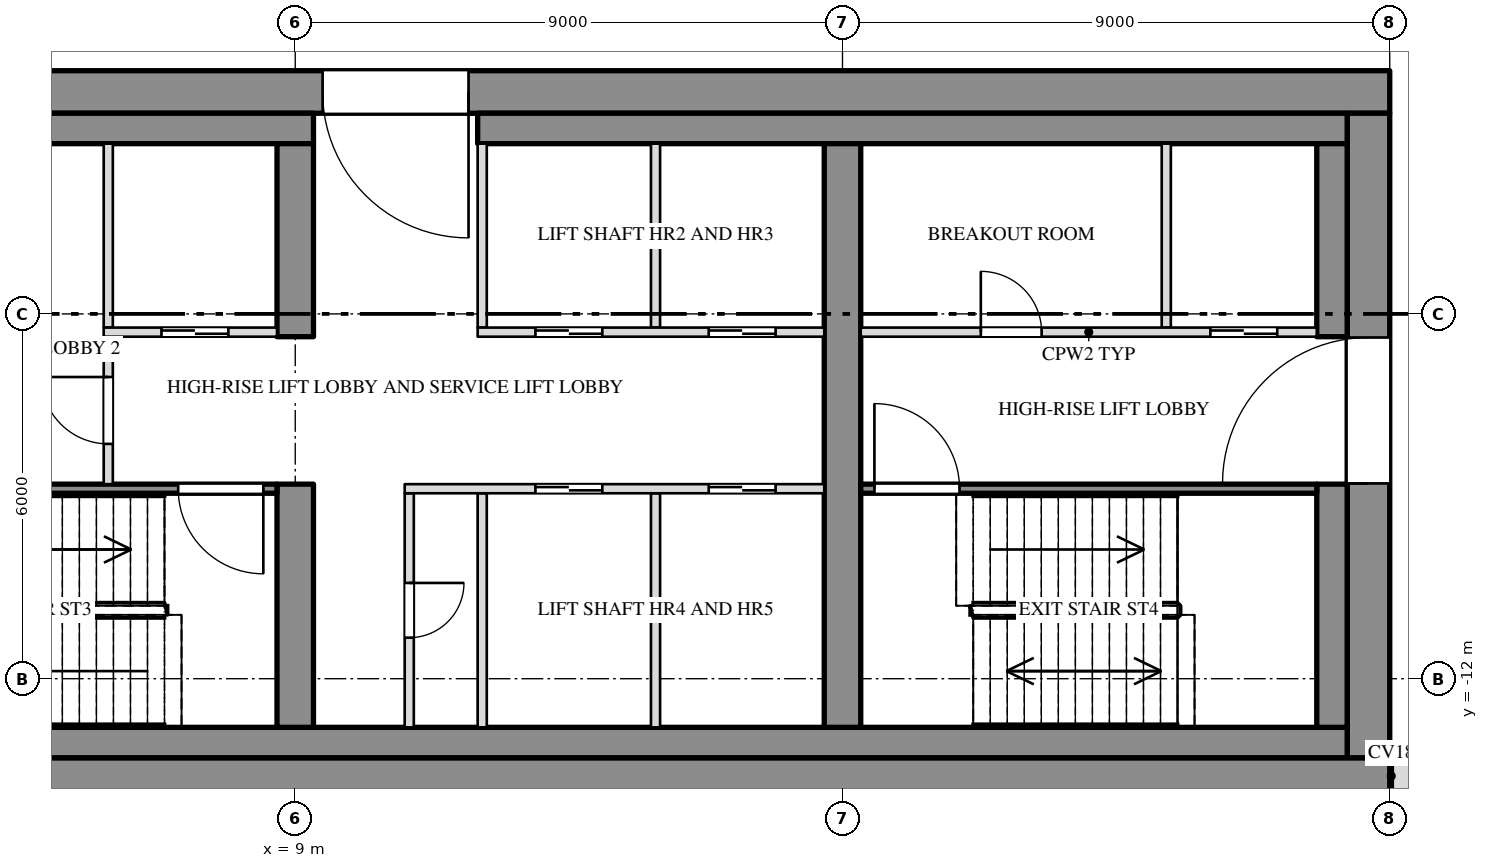
"""IFC4 building model, lengths in metres.
Left out: names, types, materials, properties, quantities, classifications, styles, units other than length and angle.
Written with IfcOpenShell. Run it as: python <this file> out.ifc"""

import sys

from ifc_helpers import new_model, si_unit, direction, frame, frame_2d, origin, place, context, subcontext, project, spatial, rectangle, extrude, element, fill, save


model = new_model("IFC4")
c1 = context("Model", 3, precision=1e-05, world=origin(), true_north=direction((0.0, 1.0)))
c2 = subcontext(c1, "Body", "Model", "MODEL_VIEW")
j1 = project(units=[si_unit("LENGTHUNIT", "METRE"), si_unit("PLANEANGLEUNIT", "RADIAN")], contexts=[c1])
p1 = place(None, origin())
s1 = spatial("IfcSite", under=j1, at=p1, CompositionType="ELEMENT")
p2 = place(p1, origin())
s2 = spatial("IfcBuilding", under=s1, at=p2, CompositionType="ELEMENT")
p3 = place(p2, frame((0.0, 0.0, 260.5)))
s3 = spatial("IfcBuildingStorey", under=s2, at=p3, CompositionType="ELEMENT", Elevation=260.5)
p4 = place(p3, frame((-27.0, -2.35, 0.0), z_axis=(0.0, 0.0, 1.0), x_axis=(1.0, 0.0, 0.0)))
e1 = element("IfcWall", 1, at=p4, inside=s3, PredefinedType="SHEAR", context=c2, shape_type="SweptSolid", body=[
    extrude(rectangle(XDim=54.0, YDim=0.7, at=frame_2d((27.0, 0.0))), origin(), (0.0, 0.0, 1.0), 3.7),
])
p5 = place(p4, frame((15.15, 0.0, 0.0)))
e2 = element("IfcOpeningElement", 2, at=p5, cuts=e1, PredefinedType="OPENING", context=c2, shape_type="SweptSolid", body=[
    extrude(rectangle(XDim=2.4, YDim=2.1, at=frame_2d((1.2, 1.05))), frame((0.0, 0.362, 0.0), z_axis=(0.0, -1.0, 0.0), x_axis=(1.0, 0.0, 0.0)), (0.0, 0.0, 1.0), 0.724),
])
p6 = place(p4, frame((36.45, 0.0, 0.0)))
e3 = element("IfcOpeningElement", 3, at=p6, cuts=e1, PredefinedType="OPENING", context=c2, shape_type="SweptSolid", body=[
    extrude(rectangle(XDim=2.4, YDim=2.1, at=frame_2d((1.2, 1.05))), frame((0.0, 0.362, 0.0), z_axis=(0.0, -1.0, 0.0), x_axis=(1.0, 0.0, 0.0)), (0.0, 0.0, 1.0), 0.724),
])
p7 = place(p3, frame((-27.0, -13.65, 0.0), z_axis=(0.0, 0.0, 1.0), x_axis=(1.0, 0.0, 0.0)))
e4 = element("IfcWall", 4, at=p7, inside=s3, PredefinedType="SHEAR", context=c2, shape_type="SweptSolid", body=[
    extrude(rectangle(XDim=54.0, YDim=0.7, at=frame_2d((27.0, 0.0))), origin(), (0.0, 0.0, 1.0), 3.7),
])
p8 = place(p3, frame((26.65, -13.3, 0.0), z_axis=(0.0, 0.0, 1.0), x_axis=(0.0, 1.0, 0.0)))
e5 = element("IfcWall", 5, at=p8, inside=s3, PredefinedType="SHEAR", context=c2, shape_type="SweptSolid", body=[
    extrude(rectangle(XDim=10.6, YDim=0.7, at=frame_2d((5.3, 0.0))), origin(), (0.0, 0.0, 1.0), 3.7),
])
p9 = place(p8, frame((4.512, 0.0, 0.0)))
e6 = element("IfcOpeningElement", 6, at=p9, cuts=e5, PredefinedType="OPENING", context=c2, shape_type="SweptSolid", body=[
    extrude(rectangle(XDim=2.4, YDim=2.1, at=frame_2d((1.2, 1.05))), frame((0.0, 0.362, 0.0), z_axis=(0.0, -1.0, 0.0), x_axis=(1.0, 0.0, 0.0)), (0.0, 0.0, 1.0), 0.724),
])
p10 = place(p3, frame((-9.3, -2.95, 0.0), z_axis=(0.0, 0.0, 1.0), x_axis=(1.0, 0.0, 0.0)))
e7 = element("IfcWall", 7, at=p10, inside=s3, PredefinedType="SHEAR", context=c2, shape_type="SweptSolid", body=[
    extrude(rectangle(XDim=18.6, YDim=0.5, at=frame_2d((9.3, 0.0))), origin(), (0.0, 0.0, 1.0), 3.7),
])
p11 = place(p3, frame((12.0, -2.95, 0.0), z_axis=(0.0, 0.0, 1.0), x_axis=(1.0, 0.0, 0.0)))
e8 = element("IfcWall", 8, at=p11, inside=s3, PredefinedType="SHEAR", context=c2, shape_type="SweptSolid", body=[
    extrude(rectangle(XDim=14.3, YDim=0.5, at=frame_2d((7.15, 0.0))), origin(), (0.0, 0.0, 1.0), 3.7),
])
p12 = place(p3, frame((-26.3, -13.05, 0.0), z_axis=(0.0, 0.0, 1.0), x_axis=(1.0, 0.0, 0.0)))
e9 = element("IfcWall", 9, at=p12, inside=s3, PredefinedType="SHEAR", context=c2, shape_type="SweptSolid", body=[
    extrude(rectangle(XDim=52.6, YDim=0.5, at=frame_2d((26.3, 0.0))), origin(), (0.0, 0.0, 1.0), 3.7),
])
p13 = place(p3, frame((26.05, -12.8, 0.0), z_axis=(0.0, 0.0, 1.0), x_axis=(0.0, 1.0, 0.0)))
e10 = element("IfcWall", 10, at=p13, inside=s3, PredefinedType="SHEAR", context=c2, shape_type="SweptSolid", body=[
    extrude(rectangle(XDim=4.0, YDim=0.5, at=frame_2d((2.0, 0.0))), origin(), (0.0, 0.0, 1.0), 3.7),
])
p14 = place(p3, frame((26.05, -6.375, 0.0), z_axis=(0.0, 0.0, 1.0), x_axis=(0.0, 1.0, 0.0)))
e11 = element("IfcWall", 11, at=p14, inside=s3, PredefinedType="SHEAR", context=c2, shape_type="SweptSolid", body=[
    extrude(rectangle(XDim=3.175, YDim=0.5, at=frame_2d((1.587, 0.0))), origin(), (0.0, 0.0, 1.0), 3.7),
])
p15 = place(p3, frame((9.0, -12.8, 0.0), z_axis=(0.0, 0.0, 1.0), x_axis=(0.0, 1.0, 0.0)))
e12 = element("IfcWall", 12, at=p15, inside=s3, PredefinedType="SHEAR", context=c2, shape_type="SweptSolid", body=[
    extrude(rectangle(XDim=4.0, YDim=0.6, at=frame_2d((2.0, 0.0))), origin(), (0.0, 0.0, 1.0), 3.7),
])
p16 = place(p3, frame((9.0, -6.375, 0.0), z_axis=(0.0, 0.0, 1.0), x_axis=(0.0, 1.0, 0.0)))
e13 = element("IfcWall", 13, at=p16, inside=s3, PredefinedType="SHEAR", context=c2, shape_type="SweptSolid", body=[
    extrude(rectangle(XDim=3.175, YDim=0.6, at=frame_2d((1.587, 0.0))), origin(), (0.0, 0.0, 1.0), 3.7),
])
p17 = place(p3, frame((18.0, -12.8, 0.0), z_axis=(0.0, 0.0, 1.0), x_axis=(0.0, 1.0, 0.0)))
e14 = element("IfcWall", 14, at=p17, inside=s3, PredefinedType="SHEAR", context=c2, shape_type="SweptSolid", body=[
    extrude(rectangle(XDim=9.6, YDim=0.6, at=frame_2d((4.8, 0.0))), origin(), (0.0, 0.0, 1.0), 3.7),
])
p18 = place(p3, frame((27.05, -13.6, 0.0), z_axis=(0.0, 0.0, 1.0), x_axis=(1.0, 0.0, 0.0)))
e15 = element("IfcWall", 15, at=p18, inside=s3, PredefinedType="SOLIDWALL", context=c2, shape_type="SweptSolid", body=[
    extrude(rectangle(XDim=2.897, YDim=0.8, at=frame_2d((1.449, 0.0))), origin(), (0.0, 0.0, 1.0), 3.7),
])
for number, where, z_axis, x_axis in (
    (16, (5.925, -6.225, 0.0), (0.0, 0.0, 1.0), (0.0, 1.0, 0.0)),
    (17, (12.075, -6.225, 0.0), (0.0, 0.0, 1.0), (0.0, 1.0, 0.0)),
    (18, (14.925, -6.225, 0.0), (0.0, 0.0, 1.0), (0.0, 1.0, 0.0)),
    (19, (23.325, -6.225, 0.0), (0.0, 0.0, 1.0), (0.0, 1.0, 0.0)),
):
    element("IfcWall", number, at=place(p3, frame(where, z_axis=z_axis, x_axis=x_axis)), inside=s3, PredefinedType="PARTITIONING", context=c2, shape_type="SweptSolid", body=[
        extrude(rectangle(XDim=3.025, YDim=0.15, at=frame_2d((1.513, 0.0))), origin(), (0.0, 0.0, 1.0), 3.7),
    ])
p19 = place(p3, frame((10.875, -12.8, 0.0), z_axis=(0.0, 0.0, 1.0), x_axis=(0.0, 1.0, 0.0)))
e20 = element("IfcWall", 20, at=p19, inside=s3, PredefinedType="PARTITIONING", context=c2, shape_type="SweptSolid", body=[
    extrude(rectangle(XDim=3.85, YDim=0.15, at=frame_2d((1.925, 0.0))), origin(), (0.0, 0.0, 1.0), 3.7),
])
p20 = place(p19, frame((1.475, 0.0, 0.0)))
e21 = element("IfcOpeningElement", 21, at=p20, cuts=e20, PredefinedType="OPENING", context=c2, shape_type="SweptSolid", body=[
    extrude(rectangle(XDim=0.9, YDim=2.1, at=frame_2d((0.45, 1.05))), frame((0.0, 0.087, 0.0), z_axis=(0.0, -1.0, 0.0), x_axis=(1.0, 0.0, 0.0)), (0.0, 0.0, 1.0), 0.174),
])
for number, where, z_axis, x_axis in (
    (22, (12.075, -12.8, 0.0), (0.0, 0.0, 1.0), (0.0, 1.0, 0.0)),
    (23, (14.925, -12.8, 0.0), (0.0, 0.0, 1.0), (0.0, 1.0, 0.0)),
):
    element("IfcWall", number, at=place(p3, frame(where, z_axis=z_axis, x_axis=x_axis)), inside=s3, PredefinedType="PARTITIONING", context=c2, shape_type="SweptSolid", body=[
        extrude(rectangle(XDim=3.85, YDim=0.15, at=frame_2d((1.925, 0.0))), origin(), (0.0, 0.0, 1.0), 3.7),
    ])
p21 = place(p3, frame((5.925, -8.8, 0.0), z_axis=(0.0, 0.0, 1.0), x_axis=(0.0, 1.0, 0.0)))
e24 = element("IfcWall", 24, at=p21, inside=s3, PredefinedType="PARTITIONING", context=c2, shape_type="SweptSolid", body=[
    extrude(rectangle(XDim=2.425, YDim=0.15, at=frame_2d((1.212, 0.0))), origin(), (0.0, 0.0, 1.0), 3.7),
])
p22 = place(p21, frame((0.662, 0.0, 0.0)))
e25 = element("IfcOpeningElement", 25, at=p22, cuts=e24, PredefinedType="OPENING", context=c2, shape_type="SweptSolid", body=[
    extrude(rectangle(XDim=1.1, YDim=2.1, at=frame_2d((0.55, 1.05))), frame((0.0, 0.087, 0.0), z_axis=(0.0, -1.0, 0.0), x_axis=(1.0, 0.0, 0.0)), (0.0, 0.0, 1.0), 0.174),
])
p23 = place(p3, frame((5.85, -6.3, 0.0), z_axis=(0.0, 0.0, 1.0), x_axis=(1.0, 0.0, 0.0)))
e26 = element("IfcWall", 26, at=p23, inside=s3, PredefinedType="PARTITIONING", context=c2, shape_type="SweptSolid", body=[
    extrude(rectangle(XDim=2.85, YDim=0.15, at=frame_2d((1.425, 0.0))), origin(), (0.0, 0.0, 1.0), 3.7),
])
p24 = place(p23, frame((0.95, 0.0, 0.0)))
e27 = element("IfcOpeningElement", 27, at=p24, cuts=e26, PredefinedType="OPENING", context=c2, shape_type="SweptSolid", body=[
    extrude(rectangle(XDim=1.1, YDim=2.1, at=frame_2d((0.55, 1.05))), frame((0.0, 0.087, 0.0), z_axis=(0.0, -1.0, 0.0), x_axis=(1.0, 0.0, 0.0)), (0.0, 0.0, 1.0), 0.174),
])
p25 = place(p3, frame((12.0, -6.3, 0.0), z_axis=(0.0, 0.0, 1.0), x_axis=(1.0, 0.0, 0.0)))
e28 = element("IfcWall", 28, at=p25, inside=s3, PredefinedType="PARTITIONING", context=c2, shape_type="SweptSolid", body=[
    extrude(rectangle(XDim=5.7, YDim=0.15, at=frame_2d((2.85, 0.0))), origin(), (0.0, 0.0, 1.0), 3.7),
])
p26 = place(p25, frame((0.95, 0.0, 0.0)))
e29 = element("IfcOpeningElement", 29, at=p26, cuts=e28, PredefinedType="OPENING", context=c2, shape_type="SweptSolid", body=[
    extrude(rectangle(XDim=1.1, YDim=2.1, at=frame_2d((0.55, 1.05))), frame((0.0, 0.087, 0.0), z_axis=(0.0, -1.0, 0.0), x_axis=(1.0, 0.0, 0.0)), (0.0, 0.0, 1.0), 0.174),
])
p27 = place(p25, frame((3.8, 0.0, 0.0)))
e30 = element("IfcOpeningElement", 30, at=p27, cuts=e28, PredefinedType="OPENING", context=c2, shape_type="SweptSolid", body=[
    extrude(rectangle(XDim=1.1, YDim=2.1, at=frame_2d((0.55, 1.05))), frame((0.0, 0.087, 0.0), z_axis=(0.0, -1.0, 0.0), x_axis=(1.0, 0.0, 0.0)), (0.0, 0.0, 1.0), 0.174),
])
p28 = place(p3, frame((18.3, -6.3, 0.0), z_axis=(0.0, 0.0, 1.0), x_axis=(1.0, 0.0, 0.0)))
e31 = element("IfcWall", 31, at=p28, inside=s3, PredefinedType="PARTITIONING", context=c2, shape_type="SweptSolid", body=[
    extrude(rectangle(XDim=7.5, YDim=0.15, at=frame_2d((3.75, 0.0))), origin(), (0.0, 0.0, 1.0), 3.7),
])
p29 = place(p28, frame((1.975, 0.0, 0.0)))
e32 = element("IfcOpeningElement", 32, at=p29, cuts=e31, PredefinedType="OPENING", context=c2, shape_type="SweptSolid", body=[
    extrude(rectangle(XDim=1.0, YDim=2.1, at=frame_2d((0.5, 1.05))), frame((0.0, 0.087, 0.0), z_axis=(0.0, -1.0, 0.0), x_axis=(1.0, 0.0, 0.0)), (0.0, 0.0, 1.0), 0.174),
])
p30 = place(p28, frame((5.75, 0.0, 0.0)))
e33 = element("IfcOpeningElement", 33, at=p30, cuts=e31, PredefinedType="OPENING", context=c2, shape_type="SweptSolid", body=[
    extrude(rectangle(XDim=1.1, YDim=2.1, at=frame_2d((0.55, 1.05))), frame((0.0, 0.087, 0.0), z_axis=(0.0, -1.0, 0.0), x_axis=(1.0, 0.0, 0.0)), (0.0, 0.0, 1.0), 0.174),
])
p31 = place(p3, frame((0.3, -8.875, 0.0), z_axis=(0.0, 0.0, 1.0), x_axis=(1.0, 0.0, 0.0)))
e34 = element("IfcWall", 34, at=p31, inside=s3, PredefinedType="SHEAR", context=c2, shape_type="SweptSolid", body=[
    extrude(rectangle(XDim=8.4, YDim=0.15, at=frame_2d((4.2, 0.0))), origin(), (0.0, 0.0, 1.0), 3.7),
])
p32 = place(p31, frame((6.775, 0.0, 0.0)))
e35 = element("IfcOpeningElement", 35, at=p32, cuts=e34, PredefinedType="OPENING", context=c2, shape_type="SweptSolid", body=[
    extrude(rectangle(XDim=1.4, YDim=2.1, at=frame_2d((0.7, 1.05))), frame((0.0, 0.087, 0.0), z_axis=(0.0, -1.0, 0.0), x_axis=(1.0, 0.0, 0.0)), (0.0, 0.0, 1.0), 0.174),
])
p33 = place(p3, frame((10.8, -8.875, 0.0), z_axis=(0.0, 0.0, 1.0), x_axis=(1.0, 0.0, 0.0)))
e36 = element("IfcWall", 36, at=p33, inside=s3, PredefinedType="PARTITIONING", context=c2, shape_type="SweptSolid", body=[
    extrude(rectangle(XDim=6.9, YDim=0.15, at=frame_2d((3.45, 0.0))), origin(), (0.0, 0.0, 1.0), 3.7),
])
p34 = place(p33, frame((2.15, 0.0, 0.0)))
e37 = element("IfcOpeningElement", 37, at=p34, cuts=e36, PredefinedType="OPENING", context=c2, shape_type="SweptSolid", body=[
    extrude(rectangle(XDim=1.1, YDim=2.1, at=frame_2d((0.55, 1.05))), frame((0.0, 0.087, 0.0), z_axis=(0.0, -1.0, 0.0), x_axis=(1.0, 0.0, 0.0)), (0.0, 0.0, 1.0), 0.174),
])
p35 = place(p33, frame((5.0, 0.0, 0.0)))
e38 = element("IfcOpeningElement", 38, at=p35, cuts=e36, PredefinedType="OPENING", context=c2, shape_type="SweptSolid", body=[
    extrude(rectangle(XDim=1.1, YDim=2.1, at=frame_2d((0.55, 1.05))), frame((0.0, 0.087, 0.0), z_axis=(0.0, -1.0, 0.0), x_axis=(1.0, 0.0, 0.0)), (0.0, 0.0, 1.0), 0.174),
])
p36 = place(p3, frame((18.3, -8.875, 0.0), z_axis=(0.0, 0.0, 1.0), x_axis=(1.0, 0.0, 0.0)))
e39 = element("IfcWall", 39, at=p36, inside=s3, PredefinedType="SHEAR", context=c2, shape_type="SweptSolid", body=[
    extrude(rectangle(XDim=7.5, YDim=0.15, at=frame_2d((3.75, 0.0))), origin(), (0.0, 0.0, 1.0), 3.7),
])
p37 = place(p36, frame((0.225, 0.0, 0.0)))
e40 = element("IfcOpeningElement", 40, at=p37, cuts=e39, PredefinedType="OPENING", context=c2, shape_type="SweptSolid", body=[
    extrude(rectangle(XDim=1.4, YDim=2.1, at=frame_2d((0.7, 1.05))), frame((0.0, 0.087, 0.0), z_axis=(0.0, -1.0, 0.0), x_axis=(1.0, 0.0, 0.0)), (0.0, 0.0, 1.0), 0.174),
])
p38 = place(p22, origin())
e41 = element("IfcDoor", 41, at=p38, inside=s3, OperationType="SINGLE_SWING_RIGHT", PredefinedType="DOOR", context=c2, shape_type="SweptSolid", body=[
    extrude(rectangle(XDim=1.1, YDim=2.1, at=frame_2d((0.55, 1.05))), frame((0.0, 0.025, 0.0), z_axis=(0.0, -1.0, 0.0), x_axis=(1.0, 0.0, 0.0)), (0.0, 0.0, 1.0), 0.05),
])
fill(e25, e41)
p39 = place(p24, origin())
e42 = element("IfcDoor", 42, at=p39, inside=s3, OperationType="SLIDING_TO_RIGHT", PredefinedType="DOOR", context=c2, shape_type="SweptSolid", body=[
    extrude(rectangle(XDim=1.1, YDim=2.1, at=frame_2d((0.55, 1.05))), frame((0.0, 0.025, 0.0), z_axis=(0.0, -1.0, 0.0), x_axis=(1.0, 0.0, 0.0)), (0.0, 0.0, 1.0), 0.05),
])
fill(e27, e42)
p40 = place(p32, origin())
e43 = element("IfcDoor", 43, at=p40, inside=s3, OperationType="DOUBLE_DOOR_SINGLE_SWING", PredefinedType="DOOR", context=c2, shape_type="SweptSolid", body=[
    extrude(rectangle(XDim=1.4, YDim=2.1, at=frame_2d((0.7, 1.05))), frame((0.0, 0.025, 0.0), z_axis=(0.0, -1.0, 0.0), x_axis=(1.0, 0.0, 0.0)), (0.0, 0.0, 1.0), 0.05),
])
fill(e35, e43)
p41 = place(p6, origin())
e44 = element("IfcDoor", 44, at=p41, inside=s3, OperationType="DOUBLE_DOOR_SINGLE_SWING", PredefinedType="DOOR", context=c2, shape_type="SweptSolid", body=[
    extrude(rectangle(XDim=2.4, YDim=2.1, at=frame_2d((1.2, 1.05))), frame((0.0, 0.025, 0.0), z_axis=(0.0, -1.0, 0.0), x_axis=(1.0, 0.0, 0.0)), (0.0, 0.0, 1.0), 0.05),
])
fill(e3, e44)
p42 = place(p20, origin())
e45 = element("IfcDoor", 45, at=p42, inside=s3, OperationType="SINGLE_SWING_LEFT", PredefinedType="DOOR", context=c2, shape_type="SweptSolid", body=[
    extrude(rectangle(XDim=0.9, YDim=2.1, at=frame_2d((0.45, 1.05))), frame((0.0, 0.025, 0.0), z_axis=(0.0, -1.0, 0.0), x_axis=(1.0, 0.0, 0.0)), (0.0, 0.0, 1.0), 0.05),
])
fill(e21, e45)
p43 = place(p34, origin())
e46 = element("IfcDoor", 46, at=p43, inside=s3, OperationType="SLIDING_TO_RIGHT", PredefinedType="DOOR", context=c2, shape_type="SweptSolid", body=[
    extrude(rectangle(XDim=1.1, YDim=2.1, at=frame_2d((0.55, 1.05))), frame((0.0, 0.025, 0.0), z_axis=(0.0, -1.0, 0.0), x_axis=(1.0, 0.0, 0.0)), (0.0, 0.0, 1.0), 0.05),
])
fill(e37, e46)
p44 = place(p26, origin())
e47 = element("IfcDoor", 47, at=p44, inside=s3, OperationType="SLIDING_TO_LEFT", PredefinedType="DOOR", context=c2, shape_type="SweptSolid", body=[
    extrude(rectangle(XDim=1.1, YDim=2.1, at=frame_2d((0.55, 1.05))), frame((0.0, 0.025, 0.0), z_axis=(0.0, -1.0, 0.0), x_axis=(1.0, 0.0, 0.0)), (0.0, 0.0, 1.0), 0.05),
])
fill(e29, e47)
p45 = place(p35, origin())
e48 = element("IfcDoor", 48, at=p45, inside=s3, OperationType="SLIDING_TO_RIGHT", PredefinedType="DOOR", context=c2, shape_type="SweptSolid", body=[
    extrude(rectangle(XDim=1.1, YDim=2.1, at=frame_2d((0.55, 1.05))), frame((0.0, 0.025, 0.0), z_axis=(0.0, -1.0, 0.0), x_axis=(1.0, 0.0, 0.0)), (0.0, 0.0, 1.0), 0.05),
])
fill(e38, e48)
p46 = place(p27, origin())
e49 = element("IfcDoor", 49, at=p46, inside=s3, OperationType="SLIDING_TO_LEFT", PredefinedType="DOOR", context=c2, shape_type="SweptSolid", body=[
    extrude(rectangle(XDim=1.1, YDim=2.1, at=frame_2d((0.55, 1.05))), frame((0.0, 0.025, 0.0), z_axis=(0.0, -1.0, 0.0), x_axis=(1.0, 0.0, 0.0)), (0.0, 0.0, 1.0), 0.05),
])
fill(e30, e49)
p47 = place(p37, origin())
e50 = element("IfcDoor", 50, at=p47, inside=s3, OperationType="DOUBLE_DOOR_SINGLE_SWING", PredefinedType="DOOR", context=c2, shape_type="SweptSolid", body=[
    extrude(rectangle(XDim=1.4, YDim=2.1, at=frame_2d((0.7, 1.05))), frame((0.0, 0.025, 0.0), z_axis=(0.0, -1.0, 0.0), x_axis=(1.0, 0.0, 0.0)), (0.0, 0.0, 1.0), 0.05),
])
fill(e40, e50)
p48 = place(p29, origin())
e51 = element("IfcDoor", 51, at=p48, inside=s3, OperationType="SINGLE_SWING_LEFT", PredefinedType="DOOR", context=c2, shape_type="SweptSolid", body=[
    extrude(rectangle(XDim=1.0, YDim=2.1, at=frame_2d((0.5, 1.05))), frame((0.0, 0.025, 0.0), z_axis=(0.0, -1.0, 0.0), x_axis=(1.0, 0.0, 0.0)), (0.0, 0.0, 1.0), 0.05),
])
fill(e32, e51)
p49 = place(p30, origin())
e52 = element("IfcDoor", 52, at=p49, inside=s3, OperationType="SLIDING_TO_RIGHT", PredefinedType="DOOR", context=c2, shape_type="SweptSolid", body=[
    extrude(rectangle(XDim=1.1, YDim=2.1, at=frame_2d((0.55, 1.05))), frame((0.0, 0.025, 0.0), z_axis=(0.0, -1.0, 0.0), x_axis=(1.0, 0.0, 0.0)), (0.0, 0.0, 1.0), 0.05),
])
fill(e33, e52)
p50 = place(p9, origin())
e53 = element("IfcDoor", 53, at=p50, inside=s3, OperationType="DOUBLE_DOOR_SINGLE_SWING", PredefinedType="DOOR", context=c2, shape_type="SweptSolid", body=[
    extrude(rectangle(XDim=2.4, YDim=2.1, at=frame_2d((1.2, 1.05))), frame((0.0, 0.025, 0.0), z_axis=(0.0, -1.0, 0.0), x_axis=(1.0, 0.0, 0.0)), (0.0, 0.0, 1.0), 0.05),
])
fill(e6, e53)
save(model, sys.argv[1])
